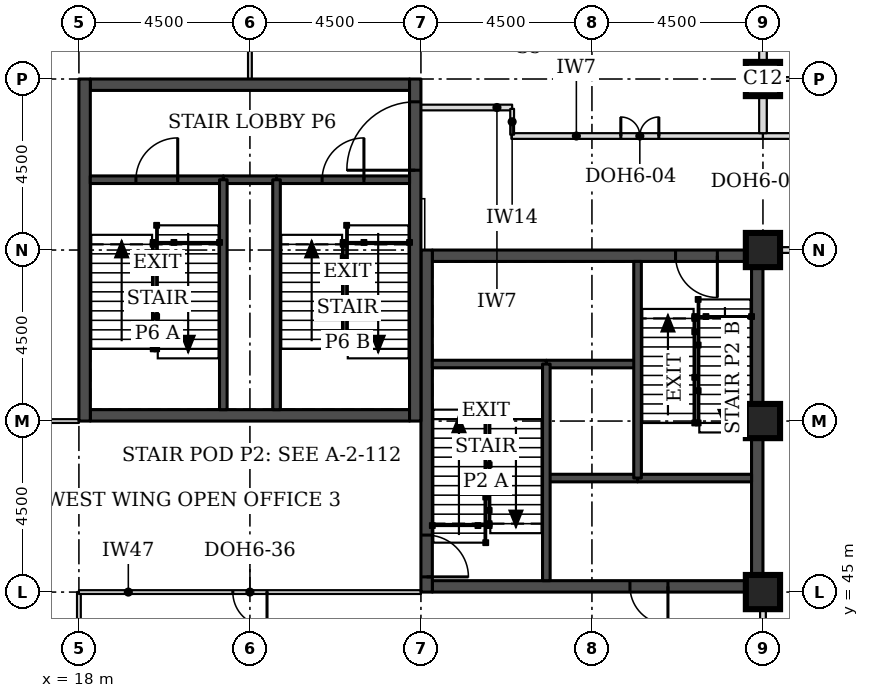
"""IFC4 building model, lengths in metres.
Left out: names, types, materials, properties, quantities, classifications, styles, units other than length and angle.
Written with IfcOpenShell. Run it as: python <this file> out.ifc"""

import sys

from ifc_helpers import new_model, si_unit, direction, frame, frame_2d, origin, origin_2d, place, context, subcontext, project, spatial, rectangle, extrude, element, fill, save


model = new_model("IFC4")
c1 = context("Model", 3, precision=1e-05, world=origin(), true_north=direction((0.0, 1.0)))
c2 = subcontext(c1, "Body", "Model", "MODEL_VIEW")
j1 = project(units=[si_unit("LENGTHUNIT", "METRE"), si_unit("PLANEANGLEUNIT", "RADIAN")], contexts=[c1])
p1 = place(None, origin())
s1 = spatial("IfcSite", under=j1, at=p1, CompositionType="ELEMENT")
p2 = place(p1, origin())
s2 = spatial("IfcBuilding", under=s1, at=p2, CompositionType="ELEMENT")
p3 = place(p2, frame((0.0, 0.0, 188.4)))
s3 = spatial("IfcBuildingStorey", under=s2, at=p3, CompositionType="ELEMENT", Elevation=188.4)
for number, where, z_axis, x_axis in (
    (1, (36.0, 45.0, 0.0), (0.0, 0.0, 1.0), (1.0, 0.0, 0.0)),
    (2, (36.0, 49.5, 0.0), (0.0, 0.0, 1.0), (1.0, 0.0, 0.0)),
    (3, (36.0, 54.0, 0.0), (0.0, 0.0, 1.0), (1.0, 0.0, 0.0)),
    (4, (36.0, 58.5, 0.0), (0.0, 0.0, 1.0), (1.0, 0.0, 0.0)),
):
    element("IfcColumn", number, at=place(p3, frame(where, z_axis=z_axis, x_axis=x_axis)), inside=s3, PredefinedType="COLUMN", context=c2, shape_type="SweptSolid", body=[
        extrude(rectangle(XDim=0.9, YDim=0.9, at=origin_2d()), origin(), (0.0, 0.0, 1.0), 3.7),
    ])
p4 = place(p3, frame((27.3, 45.15, 0.0), z_axis=(0.0, 0.0, 1.0), x_axis=(1.0, 0.0, 0.0)))
e5 = element("IfcWall", 5, at=p4, inside=s3, PredefinedType="SHEAR", context=c2, shape_type="SweptSolid", body=[
    extrude(rectangle(XDim=8.4, YDim=0.3, at=frame_2d((4.2, 0.0))), origin(), (0.0, 0.0, 1.0), 3.7),
])
p5 = place(p4, frame((5.2, 0.0, 0.0)))
e6 = element("IfcOpeningElement", 6, at=p5, cuts=e5, PredefinedType="OPENING", context=c2, shape_type="SweptSolid", body=[
    extrude(rectangle(XDim=1.0, YDim=2.1, at=frame_2d((0.5, 1.05))), frame((0.0, 0.16, 0.0), z_axis=(0.0, -1.0, 0.0), x_axis=(1.0, 0.0, 0.0)), (0.0, 0.0, 1.0), 0.32),
])
p6 = place(p3, frame((27.3, 53.85, 0.0), z_axis=(0.0, 0.0, 1.0), x_axis=(1.0, 0.0, 0.0)))
e7 = element("IfcWall", 7, at=p6, inside=s3, PredefinedType="SHEAR", context=c2, shape_type="SweptSolid", body=[
    extrude(rectangle(XDim=8.4, YDim=0.3, at=frame_2d((4.2, 0.0))), origin(), (0.0, 0.0, 1.0), 3.7),
])
p7 = place(p6, frame((6.4, 0.0, 0.0)))
e8 = element("IfcOpeningElement", 8, at=p7, cuts=e7, PredefinedType="OPENING", context=c2, shape_type="SweptSolid", body=[
    extrude(rectangle(XDim=1.1, YDim=2.1, at=frame_2d((0.55, 1.05))), frame((0.0, 0.16, 0.0), z_axis=(0.0, -1.0, 0.0), x_axis=(1.0, 0.0, 0.0)), (0.0, 0.0, 1.0), 0.32),
])
p8 = place(p3, frame((27.15, 45.0, 0.0), z_axis=(0.0, 0.0, 1.0), x_axis=(0.0, 1.0, 0.0)))
e9 = element("IfcWall", 9, at=p8, inside=s3, PredefinedType="SHEAR", context=c2, shape_type="SweptSolid", body=[
    extrude(rectangle(XDim=9.0, YDim=0.3, at=frame_2d((4.5, 0.0))), origin(), (0.0, 0.0, 1.0), 3.7),
])
p9 = place(p8, frame((0.4, 0.0, 0.0)))
e10 = element("IfcOpeningElement", 10, at=p9, cuts=e9, PredefinedType="OPENING", context=c2, shape_type="SweptSolid", body=[
    extrude(rectangle(XDim=1.1, YDim=2.1, at=frame_2d((0.55, 1.05))), frame((0.0, 0.16, 0.0), z_axis=(0.0, -1.0, 0.0), x_axis=(1.0, 0.0, 0.0)), (0.0, 0.0, 1.0), 0.32),
])
p10 = place(p3, frame((35.85, 45.0, 0.0), z_axis=(0.0, 0.0, 1.0), x_axis=(0.0, 1.0, 0.0)))
e11 = element("IfcWall", 11, at=p10, inside=s3, PredefinedType="SHEAR", context=c2, shape_type="SweptSolid", body=[
    extrude(rectangle(XDim=9.0, YDim=0.3, at=frame_2d((4.5, 0.0))), origin(), (0.0, 0.0, 1.0), 3.7),
])
for number, where, z_axis, x_axis in (
    (12, (18.3, 49.65, 0.0), (0.0, 0.0, 1.0), (1.0, 0.0, 0.0)),
    (13, (18.3, 58.35, 0.0), (0.0, 0.0, 1.0), (1.0, 0.0, 0.0)),
):
    element("IfcWall", number, at=place(p3, frame(where, z_axis=z_axis, x_axis=x_axis)), inside=s3, PredefinedType="SHEAR", context=c2, shape_type="SweptSolid", body=[
        extrude(rectangle(XDim=8.4, YDim=0.3, at=frame_2d((4.2, 0.0))), origin(), (0.0, 0.0, 1.0), 3.7),
    ])
p11 = place(p3, frame((18.15, 49.5, 0.0), z_axis=(0.0, 0.0, 1.0), x_axis=(0.0, 1.0, 0.0)))
e14 = element("IfcWall", 14, at=p11, inside=s3, PredefinedType="SHEAR", context=c2, shape_type="SweptSolid", body=[
    extrude(rectangle(XDim=9.0, YDim=0.3, at=frame_2d((4.5, 0.0))), origin(), (0.0, 0.0, 1.0), 3.7),
])
p12 = place(p3, frame((26.85, 49.5, 0.0), z_axis=(0.0, 0.0, 1.0), x_axis=(0.0, 1.0, 0.0)))
e15 = element("IfcWall", 15, at=p12, inside=s3, PredefinedType="SHEAR", context=c2, shape_type="SweptSolid", body=[
    extrude(rectangle(XDim=9.0, YDim=0.3, at=frame_2d((4.5, 0.0))), origin(), (0.0, 0.0, 1.0), 3.7),
])
p13 = place(p12, frame((6.6, 0.0, 0.0)))
e16 = element("IfcOpeningElement", 16, at=p13, cuts=e15, PredefinedType="OPENING", context=c2, shape_type="SweptSolid", body=[
    extrude(rectangle(XDim=1.8, YDim=2.1, at=frame_2d((0.9, 1.05))), frame((0.0, 0.16, 0.0), z_axis=(0.0, -1.0, 0.0), x_axis=(1.0, 0.0, 0.0)), (0.0, 0.0, 1.0), 0.32),
])
p14 = place(p3, frame((17.792, 63.676, 0.0), z_axis=(0.0, 0.0, 1.0), x_axis=(-0.707106781187, -0.707106781187, 0.0)))
e17 = element("IfcWall", 17, at=p14, inside=s3, PredefinedType="STANDARD", context=c2, shape_type="SweptSolid", body=[
    extrude(rectangle(XDim=7.027, YDim=0.35, at=frame_2d((3.513, 0.0))), origin(), (0.0, 0.0, 1.0), 3.525),
])
p15 = place(p14, frame((1.863, 0.0, 0.9)))
e18 = element("IfcOpeningElement", 18, at=p15, cuts=e17, PredefinedType="OPENING", context=c2, shape_type="SweptSolid", body=[
    extrude(rectangle(XDim=3.3, YDim=1.9, at=frame_2d((1.65, 0.95))), frame((0.0, 0.185, 0.0), z_axis=(0.0, -1.0, 0.0), x_axis=(1.0, 0.0, 0.0)), (0.0, 0.0, 1.0), 0.37),
])
p16 = place(p3, frame((12.824, 44.792, 0.0), z_axis=(0.0, 0.0, 1.0), x_axis=(0.707106781187, -0.707106781187, 0.0)))
e19 = element("IfcWall", 19, at=p16, inside=s3, PredefinedType="STANDARD", context=c2, shape_type="SweptSolid", body=[
    extrude(rectangle(XDim=7.027, YDim=0.35, at=frame_2d((3.513, 0.0))), origin(), (0.0, 0.0, 1.0), 3.525),
])
p17 = place(p16, frame((1.863, 0.0, 0.9)))
e20 = element("IfcOpeningElement", 20, at=p17, cuts=e19, PredefinedType="OPENING", context=c2, shape_type="SweptSolid", body=[
    extrude(rectangle(XDim=3.3, YDim=1.9, at=frame_2d((1.65, 0.95))), frame((0.0, 0.185, 0.0), z_axis=(0.0, -1.0, 0.0), x_axis=(1.0, 0.0, 0.0)), (0.0, 0.0, 1.0), 0.37),
])
p18 = place(p3, frame((36.45, 54.0, 0.0), z_axis=(0.0, 0.0, 1.0), x_axis=(1.0, 0.0, 0.0)))
e21 = element("IfcWall", 21, at=p18, inside=s3, PredefinedType="PARTITIONING", context=c2, shape_type="SweptSolid", body=[
    extrude(rectangle(XDim=5.625, YDim=0.15, at=frame_2d((2.812, 0.0))), origin(), (0.0, 0.0, 1.0), 3.55),
])
p19 = place(p3, frame((29.38, 57.0, 0.0), z_axis=(0.0, 0.0, 1.0), x_axis=(1.0, 0.0, 0.0)))
e22 = element("IfcWall", 22, at=p19, inside=s3, PredefinedType="PARTITIONING", context=c2, shape_type="SweptSolid", body=[
    extrude(rectangle(XDim=6.62, YDim=0.15, at=frame_2d((3.31, 0.0))), origin(), (0.0, 0.0, 1.0), 3.55),
])
p20 = place(p19, frame((2.88, 0.0, 0.0)))
e23 = element("IfcOpeningElement", 23, at=p20, cuts=e22, PredefinedType="OPENING", context=c2, shape_type="SweptSolid", body=[
    extrude(rectangle(XDim=1.0, YDim=2.1, at=frame_2d((0.5, 1.05))), frame((0.0, 0.085, 0.0), z_axis=(0.0, -1.0, 0.0), x_axis=(1.0, 0.0, 0.0)), (0.0, 0.0, 1.0), 0.17),
])
p21 = place(p3, frame((36.0, 57.0, 0.0), z_axis=(0.0, 0.0, 1.0), x_axis=(1.0, 0.0, 0.0)))
e24 = element("IfcWall", 24, at=p21, inside=s3, PredefinedType="PARTITIONING", context=c2, shape_type="SweptSolid", body=[
    extrude(rectangle(XDim=6.075, YDim=0.15, at=frame_2d((3.038, 0.0))), origin(), (0.0, 0.0, 1.0), 3.55),
])
p22 = place(p21, frame((2.55, 0.0, 0.0)))
e25 = element("IfcOpeningElement", 25, at=p22, cuts=e24, PredefinedType="OPENING", context=c2, shape_type="SweptSolid", body=[
    extrude(rectangle(XDim=1.0, YDim=2.1, at=frame_2d((0.5, 1.05))), frame((0.0, 0.085, 0.0), z_axis=(0.0, -1.0, 0.0), x_axis=(1.0, 0.0, 0.0)), (0.0, 0.0, 1.0), 0.17),
])
p23 = place(p3, frame((36.45, 58.5, 0.0), z_axis=(0.0, 0.0, 1.0), x_axis=(1.0, 0.0, 0.0)))
e26 = element("IfcWall", 26, at=p23, inside=s3, PredefinedType="PARTITIONING", context=c2, shape_type="SweptSolid", body=[
    extrude(rectangle(XDim=2.6, YDim=0.1, at=frame_2d((1.3, 0.0))), origin(), (0.0, 0.0, 1.0), 3.55),
])
p24 = place(p23, frame((0.85, 0.0, 0.0)))
e27 = element("IfcOpeningElement", 27, at=p24, cuts=e26, PredefinedType="OPENING", context=c2, shape_type="SweptSolid", body=[
    extrude(rectangle(XDim=0.9, YDim=2.1, at=frame_2d((0.45, 1.05))), frame((0.0, 0.06, 0.0), z_axis=(0.0, -1.0, 0.0), x_axis=(1.0, 0.0, 0.0)), (0.0, 0.0, 1.0), 0.12),
])
p25 = place(p3, frame((36.0, 40.95, 0.0), z_axis=(0.0, 0.0, 1.0), x_axis=(0.0, 1.0, 0.0)))
e28 = element("IfcWall", 28, at=p25, inside=s3, PredefinedType="PARTITIONING", context=c2, shape_type="SweptSolid", body=[
    extrude(rectangle(XDim=3.63, YDim=0.15, at=frame_2d((1.815, 0.0))), origin(), (0.0, 0.0, 1.0), 2.8),
])
p26 = place(p25, frame((1.4, 0.0, 0.0)))
e29 = element("IfcOpeningElement", 29, at=p26, cuts=e28, PredefinedType="OPENING", context=c2, shape_type="SweptSolid", body=[
    extrude(rectangle(XDim=0.9, YDim=2.1, at=frame_2d((0.45, 1.05))), frame((0.0, 0.085, 0.0), z_axis=(0.0, -1.0, 0.0), x_axis=(1.0, 0.0, 0.0)), (0.0, 0.0, 1.0), 0.17),
])
p27 = place(p3, frame((36.0, 57.075, 0.0), z_axis=(0.0, 0.0, 1.0), x_axis=(0.0, 1.0, 0.0)))
e30 = element("IfcWall", 30, at=p27, inside=s3, PredefinedType="PARTITIONING", context=c2, shape_type="SweptSolid", body=[
    extrude(rectangle(XDim=0.975, YDim=0.2, at=frame_2d((0.488, 0.0))), origin(), (0.0, 0.0, 1.0), 2.8),
])
p28 = place(p3, frame((36.0, 58.92, 0.0), z_axis=(0.0, 0.0, 1.0), x_axis=(0.0, 1.0, 0.0)))
e31 = element("IfcWall", 31, at=p28, inside=s3, PredefinedType="PARTITIONING", context=c2, shape_type="SweptSolid", body=[
    extrude(rectangle(XDim=1.08, YDim=0.2, at=frame_2d((0.54, 0.0))), origin(), (0.0, 0.0, 1.0), 2.8),
])
p29 = place(p3, frame((22.5, 63.0, 0.0), z_axis=(0.0, 0.0, 1.0), x_axis=(0.0, -1.0, 0.0)))
e32 = element("IfcWall", 32, at=p29, inside=s3, PredefinedType="PARTITIONING", context=c2, shape_type="SweptSolid", body=[
    extrude(rectangle(XDim=4.5, YDim=0.1, at=frame_2d((2.25, 0.0))), origin(), (0.0, 0.0, 1.0), 3.55),
])
p30 = place(p29, frame((1.8, 0.0, 0.0)))
e33 = element("IfcOpeningElement", 33, at=p30, cuts=e32, PredefinedType="OPENING", context=c2, shape_type="SweptSolid", body=[
    extrude(rectangle(XDim=0.9, YDim=2.1, at=frame_2d((0.45, 1.05))), frame((0.0, 0.06, 0.0), z_axis=(0.0, -1.0, 0.0), x_axis=(1.0, 0.0, 0.0)), (0.0, 0.0, 1.0), 0.12),
])
p31 = place(p3, frame((13.5, 49.5, 0.0), z_axis=(0.0, 0.0, 1.0), x_axis=(1.0, 0.0, 0.0)))
e34 = element("IfcWall", 34, at=p31, inside=s3, PredefinedType="PARTITIONING", context=c2, shape_type="SweptSolid", body=[
    extrude(rectangle(XDim=4.5, YDim=0.1, at=frame_2d((2.25, 0.0))), origin(), (0.0, 0.0, 1.0), 3.55),
])
p32 = place(p31, frame((1.8, 0.0, 0.0)))
e35 = element("IfcOpeningElement", 35, at=p32, cuts=e34, PredefinedType="OPENING", context=c2, shape_type="SweptSolid", body=[
    extrude(rectangle(XDim=0.9, YDim=2.1, at=frame_2d((0.45, 1.05))), frame((0.0, 0.06, 0.0), z_axis=(0.0, -1.0, 0.0), x_axis=(1.0, 0.0, 0.0)), (0.0, 0.0, 1.0), 0.12),
])
p33 = place(p3, frame((18.0, 40.5, 0.0), z_axis=(0.0, 0.0, 1.0), x_axis=(0.0, 1.0, 0.0)))
e36 = element("IfcWall", 36, at=p33, inside=s3, PredefinedType="PARTITIONING", context=c2, shape_type="SweptSolid", body=[
    extrude(rectangle(XDim=4.5, YDim=0.1, at=frame_2d((2.25, 0.0))), origin(), (0.0, 0.0, 1.0), 3.55),
])
p34 = place(p3, frame((18.0, 45.0, 0.0), z_axis=(0.0, 0.0, 1.0), x_axis=(1.0, 0.0, 0.0)))
e37 = element("IfcWall", 37, at=p34, inside=s3, PredefinedType="PARTITIONING", context=c2, shape_type="SweptSolid", body=[
    extrude(rectangle(XDim=9.0, YDim=0.1, at=frame_2d((4.5, 0.0))), origin(), (0.0, 0.0, 1.0), 2.55),
])
p35 = place(p34, frame((4.05, 0.0, 0.0)))
e38 = element("IfcOpeningElement", 38, at=p35, cuts=e37, PredefinedType="OPENING", context=c2, shape_type="SweptSolid", body=[
    extrude(rectangle(XDim=0.9, YDim=2.1, at=frame_2d((0.45, 1.05))), frame((0.0, 0.06, 0.0), z_axis=(0.0, -1.0, 0.0), x_axis=(1.0, 0.0, 0.0)), (0.0, 0.0, 1.0), 0.12),
])
p36 = place(p3, frame((27.0, 57.75, 0.0), z_axis=(0.0, 0.0, 1.0), x_axis=(1.0, 0.0, 0.0)))
e39 = element("IfcWall", 39, at=p36, inside=s3, PredefinedType="PARTITIONING", context=c2, shape_type="SweptSolid", body=[
    extrude(rectangle(XDim=2.4, YDim=0.15, at=frame_2d((1.2, 0.0))), origin(), (0.0, 0.0, 1.0), 3.55),
])
p37 = place(p3, frame((29.4, 57.715, 0.0), z_axis=(0.0, 0.0, 1.0), x_axis=(0.0, -1.0, 0.0)))
e40 = element("IfcWall", 40, at=p37, inside=s3, PredefinedType="PARTITIONING", context=c2, shape_type="SweptSolid", body=[
    extrude(rectangle(XDim=0.68, YDim=0.1, at=frame_2d((0.34, 0.0))), origin(), (0.0, 0.0, 1.0), 3.55),
])
p38 = place(p3, frame((30.3, 48.0, 0.0), z_axis=(0.0, 0.0, 1.0), x_axis=(1.0, 0.0, 0.0)))
e41 = element("IfcWall", 41, at=p38, inside=s3, PredefinedType="SOLIDWALL", context=c2, shape_type="SweptSolid", body=[
    extrude(rectangle(XDim=2.4, YDim=0.2, at=frame_2d((1.2, 0.0))), origin(), (0.0, 0.0, 1.0), 3.55),
])
p39 = place(p3, frame((32.7, 48.0, 0.0), z_axis=(0.0, 0.0, 1.0), x_axis=(1.0, 0.0, 0.0)))
e42 = element("IfcWall", 42, at=p39, inside=s3, PredefinedType="SOLIDWALL", context=c2, shape_type="SweptSolid", body=[
    extrude(rectangle(XDim=3.0, YDim=0.2, at=frame_2d((1.5, 0.0))), origin(), (0.0, 0.0, 1.0), 3.55),
])
p40 = place(p3, frame((30.3, 51.0, 0.0), z_axis=(0.0, 0.0, 1.0), x_axis=(1.0, 0.0, 0.0)))
e43 = element("IfcWall", 43, at=p40, inside=s3, PredefinedType="SOLIDWALL", context=c2, shape_type="SweptSolid", body=[
    extrude(rectangle(XDim=2.4, YDim=0.2, at=frame_2d((1.2, 0.0))), origin(), (0.0, 0.0, 1.0), 3.7),
])
p41 = place(p3, frame((27.3, 51.0, 0.0), z_axis=(0.0, 0.0, 1.0), x_axis=(1.0, 0.0, 0.0)))
e44 = element("IfcWall", 44, at=p41, inside=s3, PredefinedType="SOLIDWALL", context=c2, shape_type="SweptSolid", body=[
    extrude(rectangle(XDim=3.0, YDim=0.2, at=frame_2d((1.5, 0.0))), origin(), (0.0, 0.0, 1.0), 3.55),
])
for number, where, z_axis, x_axis in (
    (45, (30.3, 45.3, 0.0), (0.0, 0.0, 1.0), (0.0, 1.0, 0.0)),
    (46, (32.7, 48.0, 0.0), (0.0, 0.0, 1.0), (0.0, 1.0, 0.0)),
):
    element("IfcWall", number, at=place(p3, frame(where, z_axis=z_axis, x_axis=x_axis)), inside=s3, PredefinedType="SOLIDWALL", context=c2, shape_type="SweptSolid", body=[
        extrude(rectangle(XDim=5.7, YDim=0.2, at=frame_2d((2.85, 0.0))), origin(), (0.0, 0.0, 1.0), 3.55),
    ])
p42 = place(p3, frame((21.8, 55.85, 0.0), z_axis=(0.0, 0.0, 1.0), x_axis=(1.0, 0.0, 0.0)))
e47 = element("IfcWall", 47, at=p42, inside=s3, PredefinedType="SOLIDWALL", context=c2, shape_type="SweptSolid", body=[
    extrude(rectangle(XDim=1.4, YDim=0.2, at=frame_2d((0.7, 0.0))), origin(), (0.0, 0.0, 1.0), 3.55),
])
p43 = place(p3, frame((18.3, 55.85, 0.0), z_axis=(0.0, 0.0, 1.0), x_axis=(1.0, 0.0, 0.0)))
e48 = element("IfcWall", 48, at=p43, inside=s3, PredefinedType="SOLIDWALL", context=c2, shape_type="SweptSolid", body=[
    extrude(rectangle(XDim=3.5, YDim=0.2, at=frame_2d((1.75, 0.0))), origin(), (0.0, 0.0, 1.0), 3.55),
])
p44 = place(p43, frame((1.2, 0.0, 0.0)))
e49 = element("IfcOpeningElement", 49, at=p44, cuts=e48, PredefinedType="OPENING", context=c2, shape_type="SweptSolid", body=[
    extrude(rectangle(XDim=1.1, YDim=2.1, at=frame_2d((0.55, 1.05))), frame((0.0, 0.11, 0.0), z_axis=(0.0, -1.0, 0.0), x_axis=(1.0, 0.0, 0.0)), (0.0, 0.0, 1.0), 0.22),
])
p45 = place(p3, frame((23.2, 55.85, 0.0), z_axis=(0.0, 0.0, 1.0), x_axis=(1.0, 0.0, 0.0)))
e50 = element("IfcWall", 50, at=p45, inside=s3, PredefinedType="SOLIDWALL", context=c2, shape_type="SweptSolid", body=[
    extrude(rectangle(XDim=3.5, YDim=0.2, at=frame_2d((1.75, 0.0))), origin(), (0.0, 0.0, 1.0), 3.55),
])
p46 = place(p45, frame((1.2, 0.0, 0.0)))
e51 = element("IfcOpeningElement", 51, at=p46, cuts=e50, PredefinedType="OPENING", context=c2, shape_type="SweptSolid", body=[
    extrude(rectangle(XDim=1.1, YDim=2.1, at=frame_2d((0.55, 1.05))), frame((0.0, 0.11, 0.0), z_axis=(0.0, -1.0, 0.0), x_axis=(1.0, 0.0, 0.0)), (0.0, 0.0, 1.0), 0.22),
])
for number, where, z_axis, x_axis in (
    (52, (21.8, 49.8, 0.0), (0.0, 0.0, 1.0), (0.0, 1.0, 0.0)),
    (53, (23.2, 49.8, 0.0), (0.0, 0.0, 1.0), (0.0, 1.0, 0.0)),
):
    element("IfcWall", number, at=place(p3, frame(where, z_axis=z_axis, x_axis=x_axis)), inside=s3, PredefinedType="SOLIDWALL", context=c2, shape_type="SweptSolid", body=[
        extrude(rectangle(XDim=6.05, YDim=0.2, at=frame_2d((3.025, 0.0))), origin(), (0.0, 0.0, 1.0), 3.55),
    ])
p47 = place(p20, origin())
e54 = element("IfcDoor", 54, at=p47, inside=s3, OperationType="DOUBLE_DOOR_SINGLE_SWING", PredefinedType="DOOR", context=c2, shape_type="SweptSolid", body=[
    extrude(rectangle(XDim=1.0, YDim=2.1, at=frame_2d((0.5, 1.05))), frame((0.0, 0.025, 0.0), z_axis=(0.0, -1.0, 0.0), x_axis=(1.0, 0.0, 0.0)), (0.0, 0.0, 1.0), 0.05),
])
fill(e23, e54)
p48 = place(p35, frame((0.9, 0.0, 0.0), z_axis=(0.0, 0.0, 1.0), x_axis=(-1.0, 0.0, 0.0)))
e55 = element("IfcDoor", 55, at=p48, inside=s3, OperationType="SINGLE_SWING_LEFT", PredefinedType="DOOR", context=c2, shape_type="SweptSolid", body=[
    extrude(rectangle(XDim=0.9, YDim=2.1, at=frame_2d((0.45, 1.05))), frame((0.0, 0.025, 0.0), z_axis=(0.0, -1.0, 0.0), x_axis=(1.0, 0.0, 0.0)), (0.0, 0.0, 1.0), 0.05),
])
fill(e38, e55)
p49 = place(p9, frame((1.1, 0.0, 0.0), z_axis=(0.0, 0.0, 1.0), x_axis=(-1.0, 0.0, 0.0)))
e56 = element("IfcDoor", 56, at=p49, inside=s3, OperationType="SINGLE_SWING_RIGHT", PredefinedType="DOOR", context=c2, shape_type="SweptSolid", body=[
    extrude(rectangle(XDim=1.1, YDim=2.1, at=frame_2d((0.55, 1.05))), frame((0.0, 0.025, 0.0), z_axis=(0.0, -1.0, 0.0), x_axis=(1.0, 0.0, 0.0)), (0.0, 0.0, 1.0), 0.05),
])
fill(e10, e56)
p50 = place(p7, frame((1.1, 0.0, 0.0), z_axis=(0.0, 0.0, 1.0), x_axis=(-1.0, 0.0, 0.0)))
e57 = element("IfcDoor", 57, at=p50, inside=s3, OperationType="SINGLE_SWING_LEFT", PredefinedType="DOOR", context=c2, shape_type="SweptSolid", body=[
    extrude(rectangle(XDim=1.1, YDim=2.1, at=frame_2d((0.55, 1.05))), frame((0.0, 0.025, 0.0), z_axis=(0.0, -1.0, 0.0), x_axis=(1.0, 0.0, 0.0)), (0.0, 0.0, 1.0), 0.05),
])
fill(e8, e57)
p51 = place(p5, frame((1.0, 0.0, 0.0), z_axis=(0.0, 0.0, 1.0), x_axis=(-1.0, 0.0, 0.0)))
e58 = element("IfcDoor", 58, at=p51, inside=s3, OperationType="SINGLE_SWING_LEFT", PredefinedType="DOOR", context=c2, shape_type="SweptSolid", body=[
    extrude(rectangle(XDim=1.0, YDim=2.1, at=frame_2d((0.5, 1.05))), frame((0.0, 0.025, 0.0), z_axis=(0.0, -1.0, 0.0), x_axis=(1.0, 0.0, 0.0)), (0.0, 0.0, 1.0), 0.05),
])
fill(e6, e58)
p52 = place(p44, origin())
e59 = element("IfcDoor", 59, at=p52, inside=s3, OperationType="SINGLE_SWING_RIGHT", PredefinedType="DOOR", context=c2, shape_type="SweptSolid", body=[
    extrude(rectangle(XDim=1.1, YDim=2.1, at=frame_2d((0.55, 1.05))), frame((0.0, 0.025, 0.0), z_axis=(0.0, -1.0, 0.0), x_axis=(1.0, 0.0, 0.0)), (0.0, 0.0, 1.0), 0.05),
])
fill(e49, e59)
p53 = place(p46, origin())
e60 = element("IfcDoor", 60, at=p53, inside=s3, OperationType="SINGLE_SWING_RIGHT", PredefinedType="DOOR", context=c2, shape_type="SweptSolid", body=[
    extrude(rectangle(XDim=1.1, YDim=2.1, at=frame_2d((0.55, 1.05))), frame((0.0, 0.025, 0.0), z_axis=(0.0, -1.0, 0.0), x_axis=(1.0, 0.0, 0.0)), (0.0, 0.0, 1.0), 0.05),
])
fill(e51, e60)
p54 = place(p13, origin())
e61 = element("IfcDoor", 61, at=p54, inside=s3, OperationType="SINGLE_SWING_LEFT", PredefinedType="DOOR", context=c2, shape_type="SweptSolid", body=[
    extrude(rectangle(XDim=1.8, YDim=2.1, at=frame_2d((0.9, 1.05))), frame((0.0, 0.025, 0.0), z_axis=(0.0, -1.0, 0.0), x_axis=(1.0, 0.0, 0.0)), (0.0, 0.0, 1.0), 0.05),
])
fill(e16, e61)
save(model, sys.argv[1])
